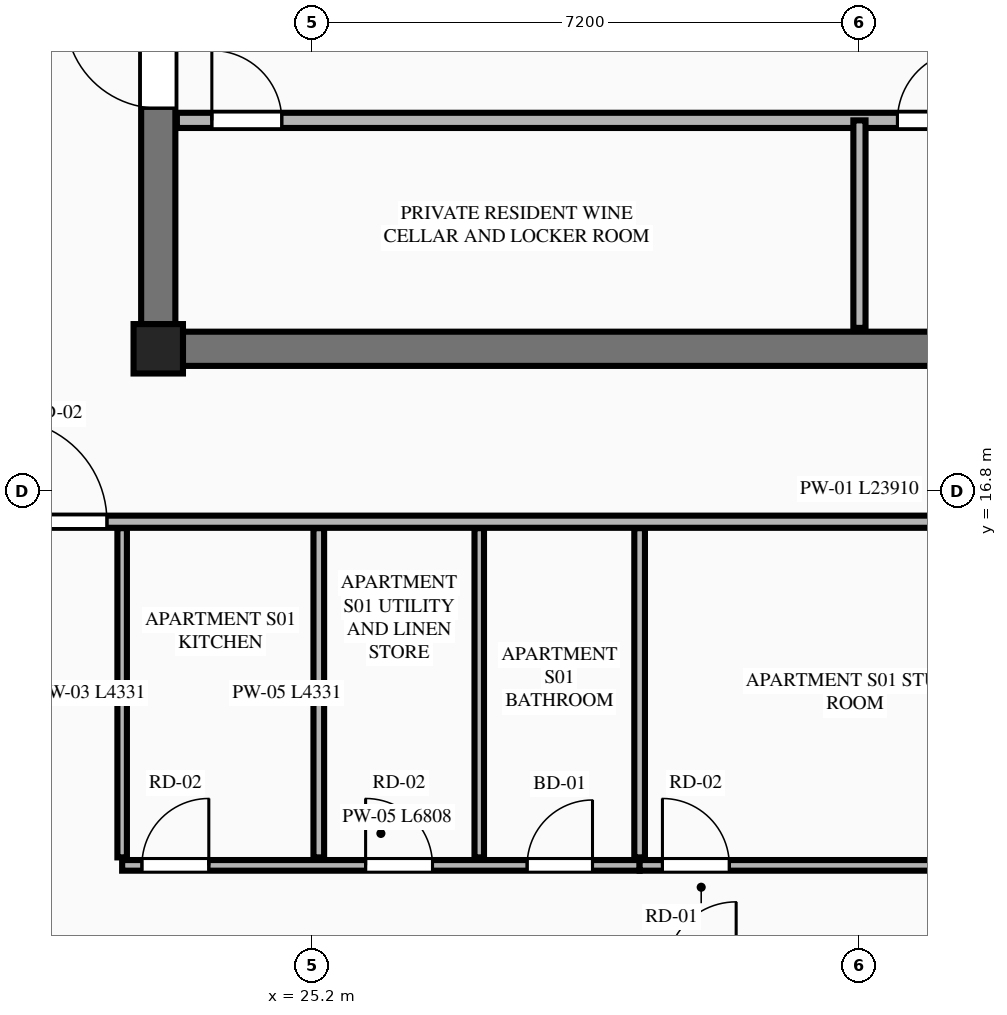
"""IFC4 building model, lengths in metres.
Left out: names, types, materials, properties, quantities, classifications, styles, units other than length and angle.
Written with IfcOpenShell. Run it as: python <this file> out.ifc"""

import sys

from ifc_helpers import new_model, si_unit, direction, frame, frame_2d, origin, origin_2d, place, context, subcontext, project, spatial, rectangle, extrude, element, fill, save


model = new_model("IFC4")
c1 = context("Model", 3, precision=1e-05, world=origin(), true_north=direction((0.0, 1.0)))
c2 = subcontext(c1, "Body", "Model", "MODEL_VIEW")
j1 = project(units=[si_unit("LENGTHUNIT", "METRE"), si_unit("PLANEANGLEUNIT", "RADIAN")], contexts=[c1])
p1 = place(None, origin())
s1 = spatial("IfcSite", under=j1, at=p1, CompositionType="ELEMENT")
p2 = place(p1, origin())
s2 = spatial("IfcBuilding", under=s1, at=p2, CompositionType="ELEMENT")
p3 = place(p2, frame((0.0, 0.0, 248.9)))
s3 = spatial("IfcBuildingStorey", under=s2, at=p3, CompositionType="ELEMENT", Elevation=248.9)
p4 = place(p3, frame((23.175, 18.675, 0.0), z_axis=(0.0, 0.0, 1.0), x_axis=(1.0, 0.0, 0.0)))
e1 = element("IfcColumn", 1, at=p4, inside=s3, PredefinedType="COLUMN", context=c2, shape_type="SweptSolid", body=[
    extrude(rectangle(XDim=0.65, YDim=0.65, at=origin_2d()), origin(), (0.0, 0.0, 1.0), 3.65),
])
p5 = place(p3, frame((23.5, 18.675, 0.0), z_axis=(0.0, 0.0, 1.0), x_axis=(1.0, 0.0, 0.0)))
e2 = element("IfcWall", 2, at=p5, inside=s3, PredefinedType="SHEAR", context=c2, shape_type="SweptSolid", body=[
    extrude(rectangle(XDim=17.8, YDim=0.45, at=frame_2d((8.9, 0.0))), origin(), (0.0, 0.0, 1.0), 3.45),
])
p6 = place(p3, frame((23.175, 19.0, 0.0), z_axis=(0.0, 0.0, 1.0), x_axis=(0.0, 1.0, 0.0)))
e3 = element("IfcWall", 3, at=p6, inside=s3, PredefinedType="SHEAR", context=c2, shape_type="SweptSolid", body=[
    extrude(rectangle(XDim=13.8, YDim=0.45, at=frame_2d((6.9, 0.0))), origin(), (0.0, 0.0, 1.0), 3.45),
])
p7 = place(p6, frame((2.84, 0.0, 0.0)))
e4 = element("IfcOpeningElement", 4, at=p7, cuts=e3, PredefinedType="OPENING", context=c2, shape_type="SweptSolid", body=[
    extrude(rectangle(XDim=1.22, YDim=2.25, at=frame_2d((0.61, 1.125))), frame((0.0, 0.235, 0.0), z_axis=(0.0, -1.0, 0.0), x_axis=(1.0, 0.0, 0.0)), (0.0, 0.0, 1.0), 0.47),
])
p8 = place(p3, frame((23.42, 21.68, 0.0), z_axis=(0.0, 0.0, 1.0), x_axis=(1.0, 0.0, 0.0)))
e5 = element("IfcWall", 5, at=p8, inside=s3, PredefinedType="PLUMBINGWALL", context=c2, shape_type="SweptSolid", body=[
    extrude(rectangle(XDim=17.96, YDim=0.2, at=frame_2d((8.98, 0.0))), origin(), (0.0, 0.0, 1.0), 3.45),
])
p9 = place(p8, frame((0.46, 0.0, 0.0)))
e6 = element("IfcOpeningElement", 6, at=p9, cuts=e5, PredefinedType="OPENING", context=c2, shape_type="SweptSolid", body=[
    extrude(rectangle(XDim=0.92, YDim=2.15, at=frame_2d((0.46, 1.075))), frame((0.0, 0.11, 0.0), z_axis=(0.0, -1.0, 0.0), x_axis=(1.0, 0.0, 0.0)), (0.0, 0.0, 1.0), 0.22),
])
p10 = place(p8, frame((9.48, 0.0, 0.0)))
e7 = element("IfcOpeningElement", 7, at=p10, cuts=e5, PredefinedType="OPENING", context=c2, shape_type="SweptSolid", body=[
    extrude(rectangle(XDim=0.92, YDim=2.15, at=frame_2d((0.46, 1.075))), frame((0.0, 0.11, 0.0), z_axis=(0.0, -1.0, 0.0), x_axis=(1.0, 0.0, 0.0)), (0.0, 0.0, 1.0), 0.22),
])
p11 = place(p3, frame((32.4, 18.95, 0.0), z_axis=(0.0, 0.0, 1.0), x_axis=(0.0, 1.0, 0.0)))
e8 = element("IfcWall", 8, at=p11, inside=s3, PredefinedType="PARTITIONING", context=c2, shape_type="SweptSolid", body=[
    extrude(rectangle(XDim=2.73, YDim=0.16, at=frame_2d((1.365, 0.0))), origin(), (0.0, 0.0, 1.0), 3.45),
])
p12 = place(p3, frame((20.445, 16.4, 0.0), z_axis=(0.0, 0.0, 1.0), x_axis=(1.0, 0.0, 0.0)))
e9 = element("IfcWall", 9, at=p12, inside=s3, PredefinedType="PARTITIONING", context=c2, shape_type="SweptSolid", body=[
    extrude(rectangle(XDim=23.91, YDim=0.16, at=frame_2d((11.955, 0.0))), origin(), (0.0, 0.0, 1.0), 3.45),
])
p13 = place(p12, frame((0.705, 0.0, 0.0)))
e10 = element("IfcOpeningElement", 10, at=p13, cuts=e9, PredefinedType="OPENING", context=c2, shape_type="SweptSolid", body=[
    extrude(rectangle(XDim=1.35, YDim=2.35, at=frame_2d((0.675, 1.175))), frame((0.0, 0.09, 0.0), z_axis=(0.0, -1.0, 0.0), x_axis=(1.0, 0.0, 0.0)), (0.0, 0.0, 1.0), 0.18),
])
p14 = place(p3, frame((22.7, 11.984, 0.0), z_axis=(0.0, 0.0, 1.0), x_axis=(0.0, 1.0, 0.0)))
e11 = element("IfcWall", 11, at=p14, inside=s3, PredefinedType="PARTITIONING", context=c2, shape_type="SweptSolid", body=[
    extrude(rectangle(XDim=4.331, YDim=0.125, at=frame_2d((2.166, 0.0))), origin(), (0.0, 0.0, 1.0), 2.907),
])
p15 = place(p3, frame((22.7, 11.879, 0.0), z_axis=(0.0, 0.0, 1.0), x_axis=(1.0, 0.0, 0.0)))
e12 = element("IfcWall", 12, at=p15, inside=s3, PredefinedType="PLUMBINGWALL", context=c2, shape_type="SweptSolid", body=[
    extrude(rectangle(XDim=6.808, YDim=0.14, at=frame_2d((3.404, 0.0))), origin(), (0.0, 0.0, 1.0), 3.45),
])
p16 = place(p15, frame((5.328, 0.0, 0.0)))
e13 = element("IfcOpeningElement", 13, at=p16, cuts=e12, PredefinedType="OPENING", context=c2, shape_type="SweptSolid", body=[
    extrude(rectangle(XDim=0.86, YDim=2.1, at=frame_2d((0.43, 1.05))), frame((0.0, 0.08, 0.0), z_axis=(0.0, -1.0, 0.0), x_axis=(1.0, 0.0, 0.0)), (0.0, 0.0, 1.0), 0.16),
])
p17 = place(p15, frame((0.26, 0.0, 0.0)))
e14 = element("IfcOpeningElement", 14, at=p17, cuts=e12, PredefinedType="OPENING", context=c2, shape_type="SweptSolid", body=[
    extrude(rectangle(XDim=0.88, YDim=2.15, at=frame_2d((0.44, 1.075))), frame((0.0, 0.08, 0.0), z_axis=(0.0, -1.0, 0.0), x_axis=(1.0, 0.0, 0.0)), (0.0, 0.0, 1.0), 0.16),
])
p18 = place(p15, frame((3.203, 0.0, 0.0)))
e15 = element("IfcOpeningElement", 15, at=p18, cuts=e12, PredefinedType="OPENING", context=c2, shape_type="SweptSolid", body=[
    extrude(rectangle(XDim=0.88, YDim=2.15, at=frame_2d((0.44, 1.075))), frame((0.0, 0.08, 0.0), z_axis=(0.0, -1.0, 0.0), x_axis=(1.0, 0.0, 0.0)), (0.0, 0.0, 1.0), 0.16),
])
p19 = place(p3, frame((29.508, 11.879, 0.0), z_axis=(0.0, 0.0, 1.0), x_axis=(1.0, 0.0, 0.0)))
e16 = element("IfcWall", 16, at=p19, inside=s3, PredefinedType="PLUMBINGWALL", context=c2, shape_type="SweptSolid", body=[
    extrude(rectangle(XDim=5.08, YDim=0.14, at=frame_2d((2.54, 0.0))), origin(), (0.0, 0.0, 1.0), 3.45),
])
p20 = place(p19, frame((0.3, 0.0, 0.0)))
e17 = element("IfcOpeningElement", 17, at=p20, cuts=e16, PredefinedType="OPENING", context=c2, shape_type="SweptSolid", body=[
    extrude(rectangle(XDim=0.88, YDim=2.15, at=frame_2d((0.44, 1.075))), frame((0.0, 0.08, 0.0), z_axis=(0.0, -1.0, 0.0), x_axis=(1.0, 0.0, 0.0)), (0.0, 0.0, 1.0), 0.16),
])
p21 = place(p3, frame((25.287, 11.984, 0.0), z_axis=(0.0, 0.0, 1.0), x_axis=(0.0, 1.0, 0.0)))
e18 = element("IfcWall", 18, at=p21, inside=s3, PredefinedType="PLUMBINGWALL", context=c2, shape_type="SweptSolid", body=[
    extrude(rectangle(XDim=4.331, YDim=0.14, at=frame_2d((2.166, 0.0))), origin(), (0.0, 0.0, 1.0), 3.45),
])
p22 = place(p3, frame((27.398, 11.984, 0.0), z_axis=(0.0, 0.0, 1.0), x_axis=(0.0, 1.0, 0.0)))
e19 = element("IfcWall", 19, at=p22, inside=s3, PredefinedType="PARTITIONING", context=c2, shape_type="SweptSolid", body=[
    extrude(rectangle(XDim=4.331, YDim=0.125, at=frame_2d((2.166, 0.0))), origin(), (0.0, 0.0, 1.0), 3.45),
])
p23 = place(p3, frame((29.508, 11.984, 0.0), z_axis=(0.0, 0.0, 1.0), x_axis=(0.0, 1.0, 0.0)))
e20 = element("IfcWall", 20, at=p23, inside=s3, PredefinedType="PLUMBINGWALL", context=c2, shape_type="SweptSolid", body=[
    extrude(rectangle(XDim=4.331, YDim=0.14, at=frame_2d((2.166, 0.0))), origin(), (0.0, 0.0, 1.0), 3.45),
])
p24 = place(p7, origin())
e21 = element("IfcDoor", 21, at=p24, inside=s3, OperationType="SINGLE_SWING_RIGHT", PredefinedType="DOOR", context=c2, shape_type="SweptSolid", body=[
    extrude(rectangle(XDim=1.22, YDim=2.25, at=frame_2d((0.61, 1.125))), frame((0.0, 0.025, 0.0), z_axis=(0.0, -1.0, 0.0), x_axis=(1.0, 0.0, 0.0)), (0.0, 0.0, 1.0), 0.05),
])
fill(e4, e21)
p25 = place(p9, origin())
e22 = element("IfcDoor", 22, at=p25, inside=s3, OperationType="SINGLE_SWING_LEFT", PredefinedType="DOOR", context=c2, shape_type="SweptSolid", body=[
    extrude(rectangle(XDim=0.92, YDim=2.15, at=frame_2d((0.46, 1.075))), frame((0.0, 0.025, 0.0), z_axis=(0.0, -1.0, 0.0), x_axis=(1.0, 0.0, 0.0)), (0.0, 0.0, 1.0), 0.05),
])
fill(e6, e22)
p26 = place(p10, origin())
e23 = element("IfcDoor", 23, at=p26, inside=s3, OperationType="SINGLE_SWING_RIGHT", PredefinedType="DOOR", context=c2, shape_type="SweptSolid", body=[
    extrude(rectangle(XDim=0.92, YDim=2.15, at=frame_2d((0.46, 1.075))), frame((0.0, 0.025, 0.0), z_axis=(0.0, -1.0, 0.0), x_axis=(1.0, 0.0, 0.0)), (0.0, 0.0, 1.0), 0.05),
])
fill(e7, e23)
p27 = place(p16, origin())
e24 = element("IfcDoor", 24, at=p27, inside=s3, OperationType="SINGLE_SWING_RIGHT", PredefinedType="DOOR", context=c2, shape_type="SweptSolid", body=[
    extrude(rectangle(XDim=0.86, YDim=2.1, at=frame_2d((0.43, 1.05))), frame((0.0, 0.025, 0.0), z_axis=(0.0, -1.0, 0.0), x_axis=(1.0, 0.0, 0.0)), (0.0, 0.0, 1.0), 0.05),
])
fill(e13, e24)
p28 = place(p13, origin())
e25 = element("IfcDoor", 25, at=p28, inside=s3, OperationType="SINGLE_SWING_LEFT", PredefinedType="DOOR", context=c2, shape_type="SweptSolid", body=[
    extrude(rectangle(XDim=1.35, YDim=2.35, at=frame_2d((0.675, 1.175))), frame((0.0, 0.025, 0.0), z_axis=(0.0, -1.0, 0.0), x_axis=(1.0, 0.0, 0.0)), (0.0, 0.0, 1.0), 0.05),
])
fill(e10, e25)
p29 = place(p17, origin())
e26 = element("IfcDoor", 26, at=p29, inside=s3, OperationType="SINGLE_SWING_RIGHT", PredefinedType="DOOR", context=c2, shape_type="SweptSolid", body=[
    extrude(rectangle(XDim=0.88, YDim=2.15, at=frame_2d((0.44, 1.075))), frame((0.0, 0.025, 0.0), z_axis=(0.0, -1.0, 0.0), x_axis=(1.0, 0.0, 0.0)), (0.0, 0.0, 1.0), 0.05),
])
fill(e14, e26)
p30 = place(p18, origin())
e27 = element("IfcDoor", 27, at=p30, inside=s3, OperationType="SINGLE_SWING_LEFT", PredefinedType="DOOR", context=c2, shape_type="SweptSolid", body=[
    extrude(rectangle(XDim=0.88, YDim=2.15, at=frame_2d((0.44, 1.075))), frame((0.0, 0.025, 0.0), z_axis=(0.0, -1.0, 0.0), x_axis=(1.0, 0.0, 0.0)), (0.0, 0.0, 1.0), 0.05),
])
fill(e15, e27)
p31 = place(p20, origin())
e28 = element("IfcDoor", 28, at=p31, inside=s3, OperationType="SINGLE_SWING_LEFT", PredefinedType="DOOR", context=c2, shape_type="SweptSolid", body=[
    extrude(rectangle(XDim=0.88, YDim=2.15, at=frame_2d((0.44, 1.075))), frame((0.0, 0.025, 0.0), z_axis=(0.0, -1.0, 0.0), x_axis=(1.0, 0.0, 0.0)), (0.0, 0.0, 1.0), 0.05),
])
fill(e17, e28)
save(model, sys.argv[1])
